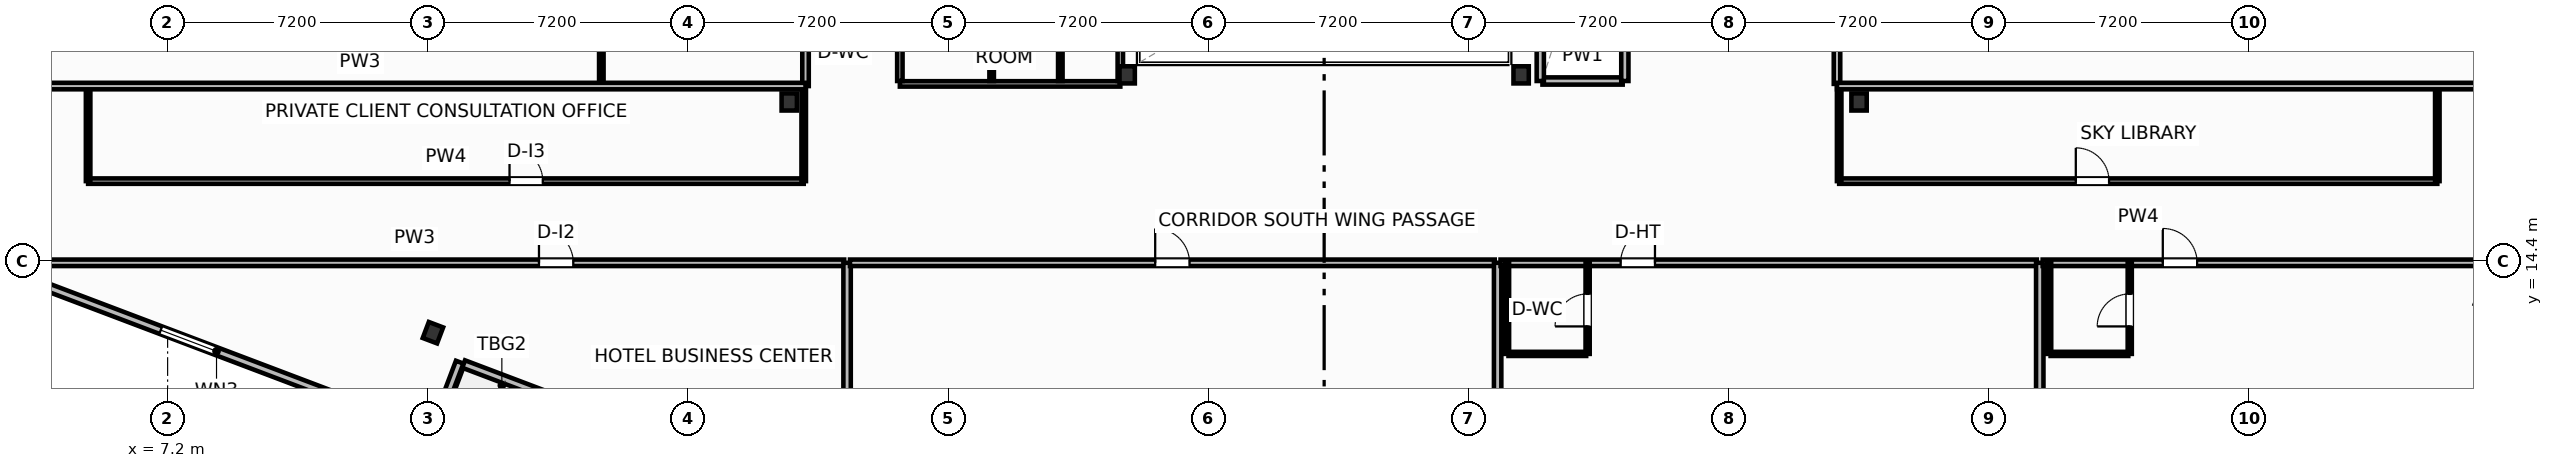
"""IFC4 building model, lengths in metres.
Left out: names, types, materials, properties, quantities, classifications, styles, units other than length and angle.
Written with IfcOpenShell. Run it as: python <this file> out.ifc"""

import sys

from ifc_helpers import new_model, si_unit, direction, frame, frame_2d, origin, origin_2d, place, context, subcontext, project, spatial, rectangle, i_section, extrude, element, fill, save


model = new_model("IFC4")
c1 = context("Model", 3, precision=1e-05, world=origin(), true_north=direction((0.0, 1.0)))
c2 = subcontext(c1, "Body", "Model", "MODEL_VIEW")
j1 = project(units=[si_unit("LENGTHUNIT", "METRE"), si_unit("PLANEANGLEUNIT", "RADIAN")], contexts=[c1])
p1 = place(None, origin())
s1 = spatial("IfcSite", under=j1, at=p1, CompositionType="ELEMENT")
p2 = place(p1, origin())
s2 = spatial("IfcBuilding", under=s1, at=p2, CompositionType="ELEMENT")
p3 = place(p2, frame((0.0, 0.0, 94.7)))
s3 = spatial("IfcBuildingStorey", under=s2, at=p3, CompositionType="ELEMENT", Elevation=94.7)
for number, where, z_axis, x_axis in (
    (1, (33.75, 19.55, 0.0), (0.0, 0.0, 1.0), (1.0, 0.0, 0.0)),
    (2, (44.65, 19.55, 0.0), (0.0, 0.0, 1.0), (1.0, 0.0, 0.0)),
    (3, (24.4, 18.8, 0.0), (0.0, 0.0, 1.0), (1.0, 0.0, 0.0)),
    (4, (54.0, 18.8, 0.0), (0.0, 0.0, 1.0), (1.0, 0.0, 0.0)),
    (5, (14.541, 12.416, 0.0), (0.0, 0.0, 1.0), (0.935, -0.354, 0.0)),
):
    element("IfcColumn", number, at=place(p3, frame(where, z_axis=z_axis, x_axis=x_axis)), inside=s3, PredefinedType="COLUMN", context=c2, shape_type="SweptSolid", body=[
        extrude(i_section(OverallWidth=0.424, OverallDepth=0.474, WebThickness=0.048, FlangeThickness=0.077, FilletRadius=0.025, at=origin_2d()), origin(), (0.0, 0.0, 1.0), 3.7),
    ])
p4 = place(p3, frame((21.0, 9.425, 0.0), z_axis=(0.0, 0.0, 1.0), x_axis=(-0.93521416643, 0.354082565101, 0.0)))
e6 = element("IfcWall", 6, at=p4, inside=s3, PredefinedType="SOLIDWALL", context=c2, shape_type="SweptSolid", body=[
    extrude(rectangle(XDim=6.0, YDim=0.22, at=frame_2d((3.0, 0.0))), origin(), (0.0, 0.0, 1.0), 2.73),
])
p5 = place(p4, frame((2.176, 0.0, 0.0)))
e7 = element("IfcOpeningElement", 7, at=p5, cuts=e6, PredefinedType="OPENING", context=c2, shape_type="SweptSolid", body=[
    extrude(rectangle(XDim=1.5, YDim=2.25, at=frame_2d((0.75, 1.125))), frame((0.0, 0.12, 0.0), z_axis=(0.0, -1.0, 0.0), x_axis=(1.0, 0.0, 0.0)), (0.0, 0.0, 1.0), 0.24),
])
p6 = place(p3, frame((1.026, 14.753, 0.0), z_axis=(0.0, 0.0, 1.0), x_axis=(0.935222448475, -0.354060689526, 0.0)))
e8 = element("IfcWall", 8, at=p6, inside=s3, PredefinedType="SOLIDWALL", context=c2, shape_type="SweptSolid", body=[
    extrude(rectangle(XDim=14.447, YDim=0.22, at=frame_2d((7.224, 0.0))), origin(), (0.0, 0.0, 1.0), 2.73),
])
p7 = place(p6, frame((6.399, 0.0, 0.8)))
e9 = element("IfcOpeningElement", 9, at=p7, cuts=e8, PredefinedType="OPENING", context=c2, shape_type="SweptSolid", body=[
    extrude(rectangle(XDim=1.65, YDim=1.65, at=frame_2d((0.825, 0.825))), frame((0.0, 0.12, 0.0), z_axis=(0.0, -1.0, 0.0), x_axis=(1.0, 0.0, 0.0)), (0.0, 0.0, 1.0), 0.24),
])
p8 = place(p3, frame((14.581, 9.755, 0.0), z_axis=(0.0, 0.0, 1.0), x_axis=(0.354061611705, 0.935222099352, 0.0)))
e10 = element("IfcWall", 10, at=p8, inside=s3, PredefinedType="SOLIDWALL", context=c2, shape_type="SweptSolid", body=[
    extrude(rectangle(XDim=1.975, YDim=0.22, at=frame_2d((0.987, 0.0))), origin(), (0.0, 0.0, 1.0), 2.73),
])
p9 = place(p3, frame((5.0, 16.61, 0.0), z_axis=(0.0, 0.0, 1.0), x_axis=(1.0, 0.0, 0.0)))
e11 = element("IfcWall", 11, at=p9, inside=s3, PredefinedType="PARTITIONING", context=c2, shape_type="SweptSolid", body=[
    extrude(rectangle(XDim=19.8, YDim=0.15, at=frame_2d((9.9, 0.0))), origin(), (0.0, 0.0, 1.0), 3.45),
])
p10 = place(p9, frame((11.66, 0.0, 0.0)))
e12 = element("IfcOpeningElement", 12, at=p10, cuts=e11, PredefinedType="OPENING", context=c2, shape_type="SweptSolid", body=[
    extrude(rectangle(XDim=0.92, YDim=2.05, at=frame_2d((0.46, 1.025))), frame((0.0, 0.085, 0.0), z_axis=(0.0, -1.0, 0.0), x_axis=(1.0, 0.0, 0.0)), (0.0, 0.0, 1.0), 0.17),
])
for number, where, z_axis, x_axis in (
    (13, (5.0, 16.61, 0.0), (0.0, 0.0, 1.0), (0.0, 1.0, 0.0)),
    (14, (24.8, 16.61, 0.0), (0.0, 0.0, 1.0), (0.0, 1.0, 0.0)),
):
    element("IfcWall", number, at=place(p3, frame(where, z_axis=z_axis, x_axis=x_axis)), inside=s3, PredefinedType="PARTITIONING", context=c2, shape_type="SweptSolid", body=[
        extrude(rectangle(XDim=2.63, YDim=0.125, at=frame_2d((1.315, 0.0))), origin(), (0.0, 0.0, 1.0), 3.45),
    ])
p11 = place(p3, frame((53.45, 16.61, 0.0), z_axis=(0.0, 0.0, 1.0), x_axis=(1.0, 0.0, 0.0)))
e15 = element("IfcWall", 15, at=p11, inside=s3, PredefinedType="PARTITIONING", context=c2, shape_type="SweptSolid", body=[
    extrude(rectangle(XDim=16.55, YDim=0.15, at=frame_2d((8.275, 0.0))), origin(), (0.0, 0.0, 1.0), 2.58),
])
p12 = place(p11, frame((6.548, 0.0, 0.0)))
e16 = element("IfcOpeningElement", 16, at=p12, cuts=e15, PredefinedType="OPENING", context=c2, shape_type="SweptSolid", body=[
    extrude(rectangle(XDim=0.92, YDim=2.05, at=frame_2d((0.46, 1.025))), frame((0.0, 0.085, 0.0), z_axis=(0.0, -1.0, 0.0), x_axis=(1.0, 0.0, 0.0)), (0.0, 0.0, 1.0), 0.17),
])
p13 = place(p3, frame((53.45, 16.61, 0.0), z_axis=(0.0, 0.0, 1.0), x_axis=(0.0, 1.0, 0.0)))
e17 = element("IfcWall", 17, at=p13, inside=s3, PredefinedType="PARTITIONING", context=c2, shape_type="SweptSolid", body=[
    extrude(rectangle(XDim=2.63, YDim=0.125, at=frame_2d((1.315, 0.0))), origin(), (0.0, 0.0, 1.0), 2.58),
])
p14 = place(p3, frame((70.0, 16.61, 0.0), z_axis=(0.0, 0.0, 1.0), x_axis=(0.0, 1.0, 0.0)))
e18 = element("IfcWall", 18, at=p14, inside=s3, PredefinedType="PARTITIONING", context=c2, shape_type="SweptSolid", body=[
    extrude(rectangle(XDim=2.63, YDim=0.125, at=frame_2d((1.315, 0.0))), origin(), (0.0, 0.0, 1.0), 2.824),
])
p15 = place(p3, frame((2.146, 14.35, 0.0), z_axis=(0.0, 0.0, 1.0), x_axis=(1.0, 0.0, 0.0)))
e19 = element("IfcWall", 19, at=p15, inside=s3, PredefinedType="PARTITIONING", context=c2, shape_type="SweptSolid", body=[
    extrude(rectangle(XDim=23.774, YDim=0.18, at=frame_2d((11.887, 0.0))), origin(), (0.0, 0.0, 1.0), 3.45),
])
p16 = place(p15, frame((15.329, 0.0, 0.0)))
e20 = element("IfcOpeningElement", 20, at=p16, cuts=e19, PredefinedType="OPENING", context=c2, shape_type="SweptSolid", body=[
    extrude(rectangle(XDim=0.95, YDim=2.05, at=frame_2d((0.475, 1.025))), frame((0.0, 0.1, 0.0), z_axis=(0.0, -1.0, 0.0), x_axis=(1.0, 0.0, 0.0)), (0.0, 0.0, 1.0), 0.2),
])
p17 = place(p3, frame((26.0, 5.319, 0.0), z_axis=(0.0, 0.0, 1.0), x_axis=(0.0, 1.0, 0.0)))
e21 = element("IfcWall", 21, at=p17, inside=s3, PredefinedType="PARTITIONING", context=c2, shape_type="SweptSolid", body=[
    extrude(rectangle(XDim=9.031, YDim=0.205, at=frame_2d((4.515, 0.0))), origin(), (0.0, 0.0, 1.0), 3.45),
])
p18 = place(p3, frame((26.08, 14.35, 0.0), z_axis=(0.0, 0.0, 1.0), x_axis=(1.0, 0.0, 0.0)))
e22 = element("IfcWall", 22, at=p18, inside=s3, PredefinedType="PARTITIONING", context=c2, shape_type="SweptSolid", body=[
    extrude(rectangle(XDim=17.84, YDim=0.18, at=frame_2d((8.92, 0.0))), origin(), (0.0, 0.0, 1.0), 3.45),
])
p19 = place(p18, frame((8.445, 0.0, 0.0)))
e23 = element("IfcOpeningElement", 23, at=p19, cuts=e22, PredefinedType="OPENING", context=c2, shape_type="SweptSolid", body=[
    extrude(rectangle(XDim=0.95, YDim=2.05, at=frame_2d((0.475, 1.025))), frame((0.0, 0.1, 0.0), z_axis=(0.0, -1.0, 0.0), x_axis=(1.0, 0.0, 0.0)), (0.0, 0.0, 1.0), 0.2),
])
p20 = place(p3, frame((44.0, 0.75, 0.0), z_axis=(0.0, 0.0, 1.0), x_axis=(0.0, 1.0, 0.0)))
e24 = element("IfcWall", 24, at=p20, inside=s3, PredefinedType="PARTITIONING", context=c2, shape_type="SweptSolid", body=[
    extrude(rectangle(XDim=13.6, YDim=0.205, at=frame_2d((6.8, 0.0))), origin(), (0.0, 0.0, 1.0), 3.45),
])
p21 = place(p3, frame((44.08, 14.35, 0.0), z_axis=(0.0, 0.0, 1.0), x_axis=(1.0, 0.0, 0.0)))
e25 = element("IfcWall", 25, at=p21, inside=s3, PredefinedType="PARTITIONING", context=c2, shape_type="SweptSolid", body=[
    extrude(rectangle(XDim=14.84, YDim=0.18, at=frame_2d((7.42, 0.0))), origin(), (0.0, 0.0, 1.0), 3.45),
])
p22 = place(p21, frame((3.323, 0.0, 0.0)))
e26 = element("IfcOpeningElement", 26, at=p22, cuts=e25, PredefinedType="OPENING", context=c2, shape_type="SweptSolid", body=[
    extrude(rectangle(XDim=0.95, YDim=2.15, at=frame_2d((0.475, 1.075))), frame((0.0, 0.1, 0.0), z_axis=(0.0, -1.0, 0.0), x_axis=(1.0, 0.0, 0.0)), (0.0, 0.0, 1.0), 0.2),
])
p23 = place(p3, frame((44.3, 11.83, 0.0), z_axis=(0.0, 0.0, 1.0), x_axis=(1.0, 0.0, 0.0)))
e27 = element("IfcWall", 27, at=p23, inside=s3, PredefinedType="PARTITIONING", context=c2, shape_type="SweptSolid", body=[
    extrude(rectangle(XDim=2.15, YDim=0.115, at=frame_2d((1.075, 0.0))), origin(), (0.0, 0.0, 1.0), 3.45),
])
p24 = place(p3, frame((46.49, 11.83, 0.0), z_axis=(0.0, 0.0, 1.0), x_axis=(0.0, 1.0, 0.0)))
e28 = element("IfcWall", 28, at=p24, inside=s3, PredefinedType="PARTITIONING", context=c2, shape_type="SweptSolid", body=[
    extrude(rectangle(XDim=2.52, YDim=0.115, at=frame_2d((1.26, 0.0))), origin(), (0.0, 0.0, 1.0), 3.45),
])
p25 = place(p24, frame((0.76, 0.0, 0.0)))
e29 = element("IfcOpeningElement", 29, at=p25, cuts=e28, PredefinedType="OPENING", context=c2, shape_type="SweptSolid", body=[
    extrude(rectangle(XDim=0.9, YDim=2.05, at=frame_2d((0.45, 1.025))), frame((0.0, 0.067, 0.0), z_axis=(0.0, -1.0, 0.0), x_axis=(1.0, 0.0, 0.0)), (0.0, 0.0, 1.0), 0.135),
])
p26 = place(p3, frame((44.26, 11.83, 0.0), z_axis=(0.0, 0.0, 1.0), x_axis=(0.0, 1.0, 0.0)))
e30 = element("IfcWall", 30, at=p26, inside=s3, PredefinedType="PARTITIONING", context=c2, shape_type="SweptSolid", body=[
    extrude(rectangle(XDim=2.52, YDim=0.115, at=frame_2d((1.26, 0.0))), origin(), (0.0, 0.0, 1.0), 3.45),
])
p27 = place(p3, frame((59.0, -4.0, 0.0), z_axis=(0.0, 0.0, 1.0), x_axis=(0.0, 1.0, 0.0)))
e31 = element("IfcWall", 31, at=p27, inside=s3, PredefinedType="PARTITIONING", context=c2, shape_type="SweptSolid", body=[
    extrude(rectangle(XDim=18.35, YDim=0.205, at=frame_2d((9.175, 0.0))), origin(), (0.0, 0.0, 1.0), 3.45),
])
p28 = place(p3, frame((59.08, 14.35, 0.0), z_axis=(0.0, 0.0, 1.0), x_axis=(1.0, 0.0, 0.0)))
e32 = element("IfcWall", 32, at=p28, inside=s3, PredefinedType="PARTITIONING", context=c2, shape_type="SweptSolid", body=[
    extrude(rectangle(XDim=15.775, YDim=0.18, at=frame_2d((7.888, 0.0))), origin(), (0.0, 0.0, 1.0), 2.58),
])
p29 = place(p28, frame((3.324, 0.0, 0.0)))
e33 = element("IfcOpeningElement", 33, at=p29, cuts=e32, PredefinedType="OPENING", context=c2, shape_type="SweptSolid", body=[
    extrude(rectangle(XDim=0.95, YDim=2.15, at=frame_2d((0.475, 1.075))), frame((0.0, 0.1, 0.0), z_axis=(0.0, -1.0, 0.0), x_axis=(1.0, 0.0, 0.0)), (0.0, 0.0, 1.0), 0.2),
])
p30 = place(p3, frame((59.3, 11.83, 0.0), z_axis=(0.0, 0.0, 1.0), x_axis=(1.0, 0.0, 0.0)))
e34 = element("IfcWall", 34, at=p30, inside=s3, PredefinedType="PARTITIONING", context=c2, shape_type="SweptSolid", body=[
    extrude(rectangle(XDim=2.15, YDim=0.115, at=frame_2d((1.075, 0.0))), origin(), (0.0, 0.0, 1.0), 3.45),
])
p31 = place(p3, frame((61.49, 11.83, 0.0), z_axis=(0.0, 0.0, 1.0), x_axis=(0.0, 1.0, 0.0)))
e35 = element("IfcWall", 35, at=p31, inside=s3, PredefinedType="PARTITIONING", context=c2, shape_type="SweptSolid", body=[
    extrude(rectangle(XDim=2.52, YDim=0.115, at=frame_2d((1.26, 0.0))), origin(), (0.0, 0.0, 1.0), 3.45),
])
p32 = place(p31, frame((0.76, 0.0, 0.0)))
e36 = element("IfcOpeningElement", 36, at=p32, cuts=e35, PredefinedType="OPENING", context=c2, shape_type="SweptSolid", body=[
    extrude(rectangle(XDim=0.9, YDim=2.05, at=frame_2d((0.45, 1.025))), frame((0.0, 0.067, 0.0), z_axis=(0.0, -1.0, 0.0), x_axis=(1.0, 0.0, 0.0)), (0.0, 0.0, 1.0), 0.135),
])
p33 = place(p3, frame((59.26, 11.83, 0.0), z_axis=(0.0, 0.0, 1.0), x_axis=(0.0, 1.0, 0.0)))
e37 = element("IfcWall", 37, at=p33, inside=s3, PredefinedType="PARTITIONING", context=c2, shape_type="SweptSolid", body=[
    extrude(rectangle(XDim=2.52, YDim=0.115, at=frame_2d((1.26, 0.0))), origin(), (0.0, 0.0, 1.0), 3.45),
])
p34 = place(p3, frame((24.85, 19.24, 0.0), z_axis=(0.0, 0.0, 1.0), x_axis=(0.0, 1.0, 0.0)))
e38 = element("IfcWall", 38, at=p34, inside=s3, PredefinedType="PARTITIONING", context=c2, shape_type="SweptSolid", body=[
    extrude(rectangle(XDim=7.42, YDim=0.18, at=frame_2d((3.71, 0.0))), origin(), (0.0, 0.0, 1.0), 3.45),
])
p35 = place(p34, frame((2.4, 0.0, 0.0)))
e39 = element("IfcOpeningElement", 39, at=p35, cuts=e38, PredefinedType="OPENING", context=c2, shape_type="SweptSolid", body=[
    extrude(rectangle(XDim=0.92, YDim=2.05, at=frame_2d((0.46, 1.025))), frame((0.0, 0.1, 0.0), z_axis=(0.0, -1.0, 0.0), x_axis=(1.0, 0.0, 0.0)), (0.0, 0.0, 1.0), 0.2),
])
p36 = place(p3, frame((19.2, 19.24, 0.0), z_axis=(0.0, 0.0, 1.0), x_axis=(0.0, 1.0, 0.0)))
e40 = element("IfcWall", 40, at=p36, inside=s3, PredefinedType="PARTITIONING", context=c2, shape_type="SweptSolid", body=[
    extrude(rectangle(XDim=7.42, YDim=0.125, at=frame_2d((3.71, 0.0))), origin(), (0.0, 0.0, 1.0), 3.45),
])
p37 = place(p3, frame((0.2, 19.24, 0.0), z_axis=(0.0, 0.0, 1.0), x_axis=(1.0, 0.0, 0.0)))
e41 = element("IfcWall", 41, at=p37, inside=s3, PredefinedType="PARTITIONING", context=c2, shape_type="SweptSolid", body=[
    extrude(rectangle(XDim=24.65, YDim=0.18, at=frame_2d((12.325, 0.0))), origin(), (0.0, 0.0, 1.0), 3.45),
])
p38 = place(p3, frame((53.39, 19.3, 0.0), z_axis=(0.0, 0.0, 1.0), x_axis=(0.0, 1.0, 0.0)))
e42 = element("IfcWall", 42, at=p38, inside=s3, PredefinedType="PARTITIONING", context=c2, shape_type="SweptSolid", body=[
    extrude(rectangle(XDim=8.07, YDim=0.18, at=frame_2d((4.035, 0.0))), origin(), (0.0, 0.0, 1.0), 3.45),
])
p39 = place(p38, frame((2.2, 0.0, 0.0)))
e43 = element("IfcOpeningElement", 43, at=p39, cuts=e42, PredefinedType="OPENING", context=c2, shape_type="SweptSolid", body=[
    extrude(rectangle(XDim=0.92, YDim=2.05, at=frame_2d((0.46, 1.025))), frame((0.0, 0.1, 0.0), z_axis=(0.0, -1.0, 0.0), x_axis=(1.0, 0.0, 0.0)), (0.0, 0.0, 1.0), 0.2),
])
p40 = place(p3, frame((53.39, 19.24, 0.0), z_axis=(0.0, 0.0, 1.0), x_axis=(1.0, 0.0, 0.0)))
e44 = element("IfcWall", 44, at=p40, inside=s3, PredefinedType="PARTITIONING", context=c2, shape_type="SweptSolid", body=[
    extrude(rectangle(XDim=23.317, YDim=0.18, at=frame_2d((11.658, 0.0))), origin(), (0.0, 0.0, 1.0), 3.45),
])
p41 = place(p3, frame((27.46, 19.3, 0.0), z_axis=(0.0, 0.0, 1.0), x_axis=(1.0, 0.0, 0.0)))
e45 = element("IfcWall", 45, at=p41, inside=s3, PredefinedType="PARTITIONING", context=c2, shape_type="SweptSolid", body=[
    extrude(rectangle(XDim=6.1, YDim=0.15, at=frame_2d((3.05, 0.0))), origin(), (0.0, 0.0, 1.0), 2.662),
])
for number, where, z_axis, x_axis in (
    (46, (30.0, 19.38, 0.0), (0.0, 0.0, 1.0), (0.0, 1.0, 0.0)),
    (47, (31.9, 19.38, 0.0), (0.0, 0.0, 1.0), (0.0, 1.0, 0.0)),
):
    element("IfcWall", number, at=place(p3, frame(where, z_axis=z_axis, x_axis=x_axis)), inside=s3, PredefinedType="PARTITIONING", context=c2, shape_type="SweptSolid", body=[
        extrude(rectangle(XDim=3.82, YDim=0.125, at=frame_2d((1.91, 0.0))), origin(), (0.0, 0.0, 1.0), 3.45),
    ])
p42 = place(p3, frame((27.46, 19.38, 0.0), z_axis=(0.0, 0.0, 1.0), x_axis=(0.0, 1.0, 0.0)))
e48 = element("IfcWall", 48, at=p42, inside=s3, PredefinedType="PARTITIONING", context=c2, shape_type="SweptSolid", body=[
    extrude(rectangle(XDim=7.16, YDim=0.15, at=frame_2d((3.58, 0.0))), origin(), (0.0, 0.0, 1.0), 3.45),
])
p43 = place(p42, frame((1.1, 0.0, 0.0)))
e49 = element("IfcOpeningElement", 49, at=p43, cuts=e48, PredefinedType="OPENING", context=c2, shape_type="SweptSolid", body=[
    extrude(rectangle(XDim=0.9, YDim=2.05, at=frame_2d((0.45, 1.025))), frame((0.0, 0.085, 0.0), z_axis=(0.0, -1.0, 0.0), x_axis=(1.0, 0.0, 0.0)), (0.0, 0.0, 1.0), 0.17),
])
p44 = place(p3, frame((33.56, 19.38, 0.0), z_axis=(0.0, 0.0, 1.0), x_axis=(0.0, 1.0, 0.0)))
e50 = element("IfcWall", 50, at=p44, inside=s3, PredefinedType="PARTITIONING", context=c2, shape_type="SweptSolid", body=[
    extrude(rectangle(XDim=7.16, YDim=0.15, at=frame_2d((3.58, 0.0))), origin(), (0.0, 0.0, 1.0), 2.824),
])
p45 = place(p3, frame((45.24, 19.38, 0.0), z_axis=(0.0, 0.0, 1.0), x_axis=(1.0, 0.0, 0.0)))
e51 = element("IfcWall", 51, at=p45, inside=s3, PredefinedType="PARTITIONING", context=c2, shape_type="SweptSolid", body=[
    extrude(rectangle(XDim=2.22, YDim=0.2, at=frame_2d((1.11, 0.0))), origin(), (0.0, 0.0, 1.0), 2.662),
])
for number, where, z_axis, x_axis in (
    (52, (45.18, 19.38, 0.0), (0.0, 0.0, 1.0), (0.0, 1.0, 0.0)),
    (53, (47.52, 19.38, 0.0), (0.0, 0.0, 1.0), (0.0, 1.0, 0.0)),
):
    element("IfcWall", number, at=place(p3, frame(where, z_axis=z_axis, x_axis=x_axis)), inside=s3, PredefinedType="PARTITIONING", context=c2, shape_type="SweptSolid", body=[
        extrude(rectangle(XDim=6.9, YDim=0.2, at=frame_2d((3.45, 0.0))), origin(), (0.0, 0.0, 1.0), 3.45),
    ])
p46 = place(p7, origin())
e54 = element("IfcWindow", 54, at=p46, inside=s3, PartitioningType="SINGLE_PANEL", PredefinedType="WINDOW", context=c2, shape_type="SweptSolid", body=[
    extrude(rectangle(XDim=1.65, YDim=1.65, at=frame_2d((0.825, 0.825))), frame((0.0, 0.03, 0.0), z_axis=(0.0, -1.0, 0.0), x_axis=(1.0, 0.0, 0.0)), (0.0, 0.0, 1.0), 0.06),
])
fill(e9, e54)
p47 = place(p10, origin())
e55 = element("IfcDoor", 55, at=p47, inside=s3, OperationType="SINGLE_SWING_LEFT", PredefinedType="DOOR", context=c2, shape_type="SweptSolid", body=[
    extrude(rectangle(XDim=0.92, YDim=2.05, at=frame_2d((0.46, 1.025))), frame((0.0, 0.025, 0.0), z_axis=(0.0, -1.0, 0.0), x_axis=(1.0, 0.0, 0.0)), (0.0, 0.0, 1.0), 0.05),
])
fill(e12, e55)
p48 = place(p12, origin())
e56 = element("IfcDoor", 56, at=p48, inside=s3, OperationType="SINGLE_SWING_LEFT", PredefinedType="DOOR", context=c2, shape_type="SweptSolid", body=[
    extrude(rectangle(XDim=0.92, YDim=2.05, at=frame_2d((0.46, 1.025))), frame((0.0, 0.025, 0.0), z_axis=(0.0, -1.0, 0.0), x_axis=(1.0, 0.0, 0.0)), (0.0, 0.0, 1.0), 0.05),
])
fill(e16, e56)
p49 = place(p16, origin())
e57 = element("IfcDoor", 57, at=p49, inside=s3, OperationType="SINGLE_SWING_LEFT", PredefinedType="DOOR", context=c2, shape_type="SweptSolid", body=[
    extrude(rectangle(XDim=0.95, YDim=2.05, at=frame_2d((0.475, 1.025))), frame((0.0, 0.025, 0.0), z_axis=(0.0, -1.0, 0.0), x_axis=(1.0, 0.0, 0.0)), (0.0, 0.0, 1.0), 0.05),
])
fill(e20, e57)
p50 = place(p19, origin())
e58 = element("IfcDoor", 58, at=p50, inside=s3, OperationType="SINGLE_SWING_LEFT", PredefinedType="DOOR", context=c2, shape_type="SweptSolid", body=[
    extrude(rectangle(XDim=0.95, YDim=2.05, at=frame_2d((0.475, 1.025))), frame((0.0, 0.025, 0.0), z_axis=(0.0, -1.0, 0.0), x_axis=(1.0, 0.0, 0.0)), (0.0, 0.0, 1.0), 0.05),
])
fill(e23, e58)
p51 = place(p22, origin())
e59 = element("IfcDoor", 59, at=p51, inside=s3, OperationType="SINGLE_SWING_RIGHT", PredefinedType="DOOR", context=c2, shape_type="SweptSolid", body=[
    extrude(rectangle(XDim=0.95, YDim=2.15, at=frame_2d((0.475, 1.075))), frame((0.0, 0.025, 0.0), z_axis=(0.0, -1.0, 0.0), x_axis=(1.0, 0.0, 0.0)), (0.0, 0.0, 1.0), 0.05),
])
fill(e26, e59)
p52 = place(p25, origin())
e60 = element("IfcDoor", 60, at=p52, inside=s3, OperationType="SINGLE_SWING_LEFT", PredefinedType="DOOR", context=c2, shape_type="SweptSolid", body=[
    extrude(rectangle(XDim=0.9, YDim=2.05, at=frame_2d((0.45, 1.025))), frame((0.0, 0.025, 0.0), z_axis=(0.0, -1.0, 0.0), x_axis=(1.0, 0.0, 0.0)), (0.0, 0.0, 1.0), 0.05),
])
fill(e29, e60)
p53 = place(p29, origin())
e61 = element("IfcDoor", 61, at=p53, inside=s3, OperationType="SINGLE_SWING_LEFT", PredefinedType="DOOR", context=c2, shape_type="SweptSolid", body=[
    extrude(rectangle(XDim=0.95, YDim=2.15, at=frame_2d((0.475, 1.075))), frame((0.0, 0.025, 0.0), z_axis=(0.0, -1.0, 0.0), x_axis=(1.0, 0.0, 0.0)), (0.0, 0.0, 1.0), 0.05),
])
fill(e33, e61)
p54 = place(p32, origin())
e62 = element("IfcDoor", 62, at=p54, inside=s3, OperationType="SINGLE_SWING_LEFT", PredefinedType="DOOR", context=c2, shape_type="SweptSolid", body=[
    extrude(rectangle(XDim=0.9, YDim=2.05, at=frame_2d((0.45, 1.025))), frame((0.0, 0.025, 0.0), z_axis=(0.0, -1.0, 0.0), x_axis=(1.0, 0.0, 0.0)), (0.0, 0.0, 1.0), 0.05),
])
fill(e36, e62)
save(model, sys.argv[1])
